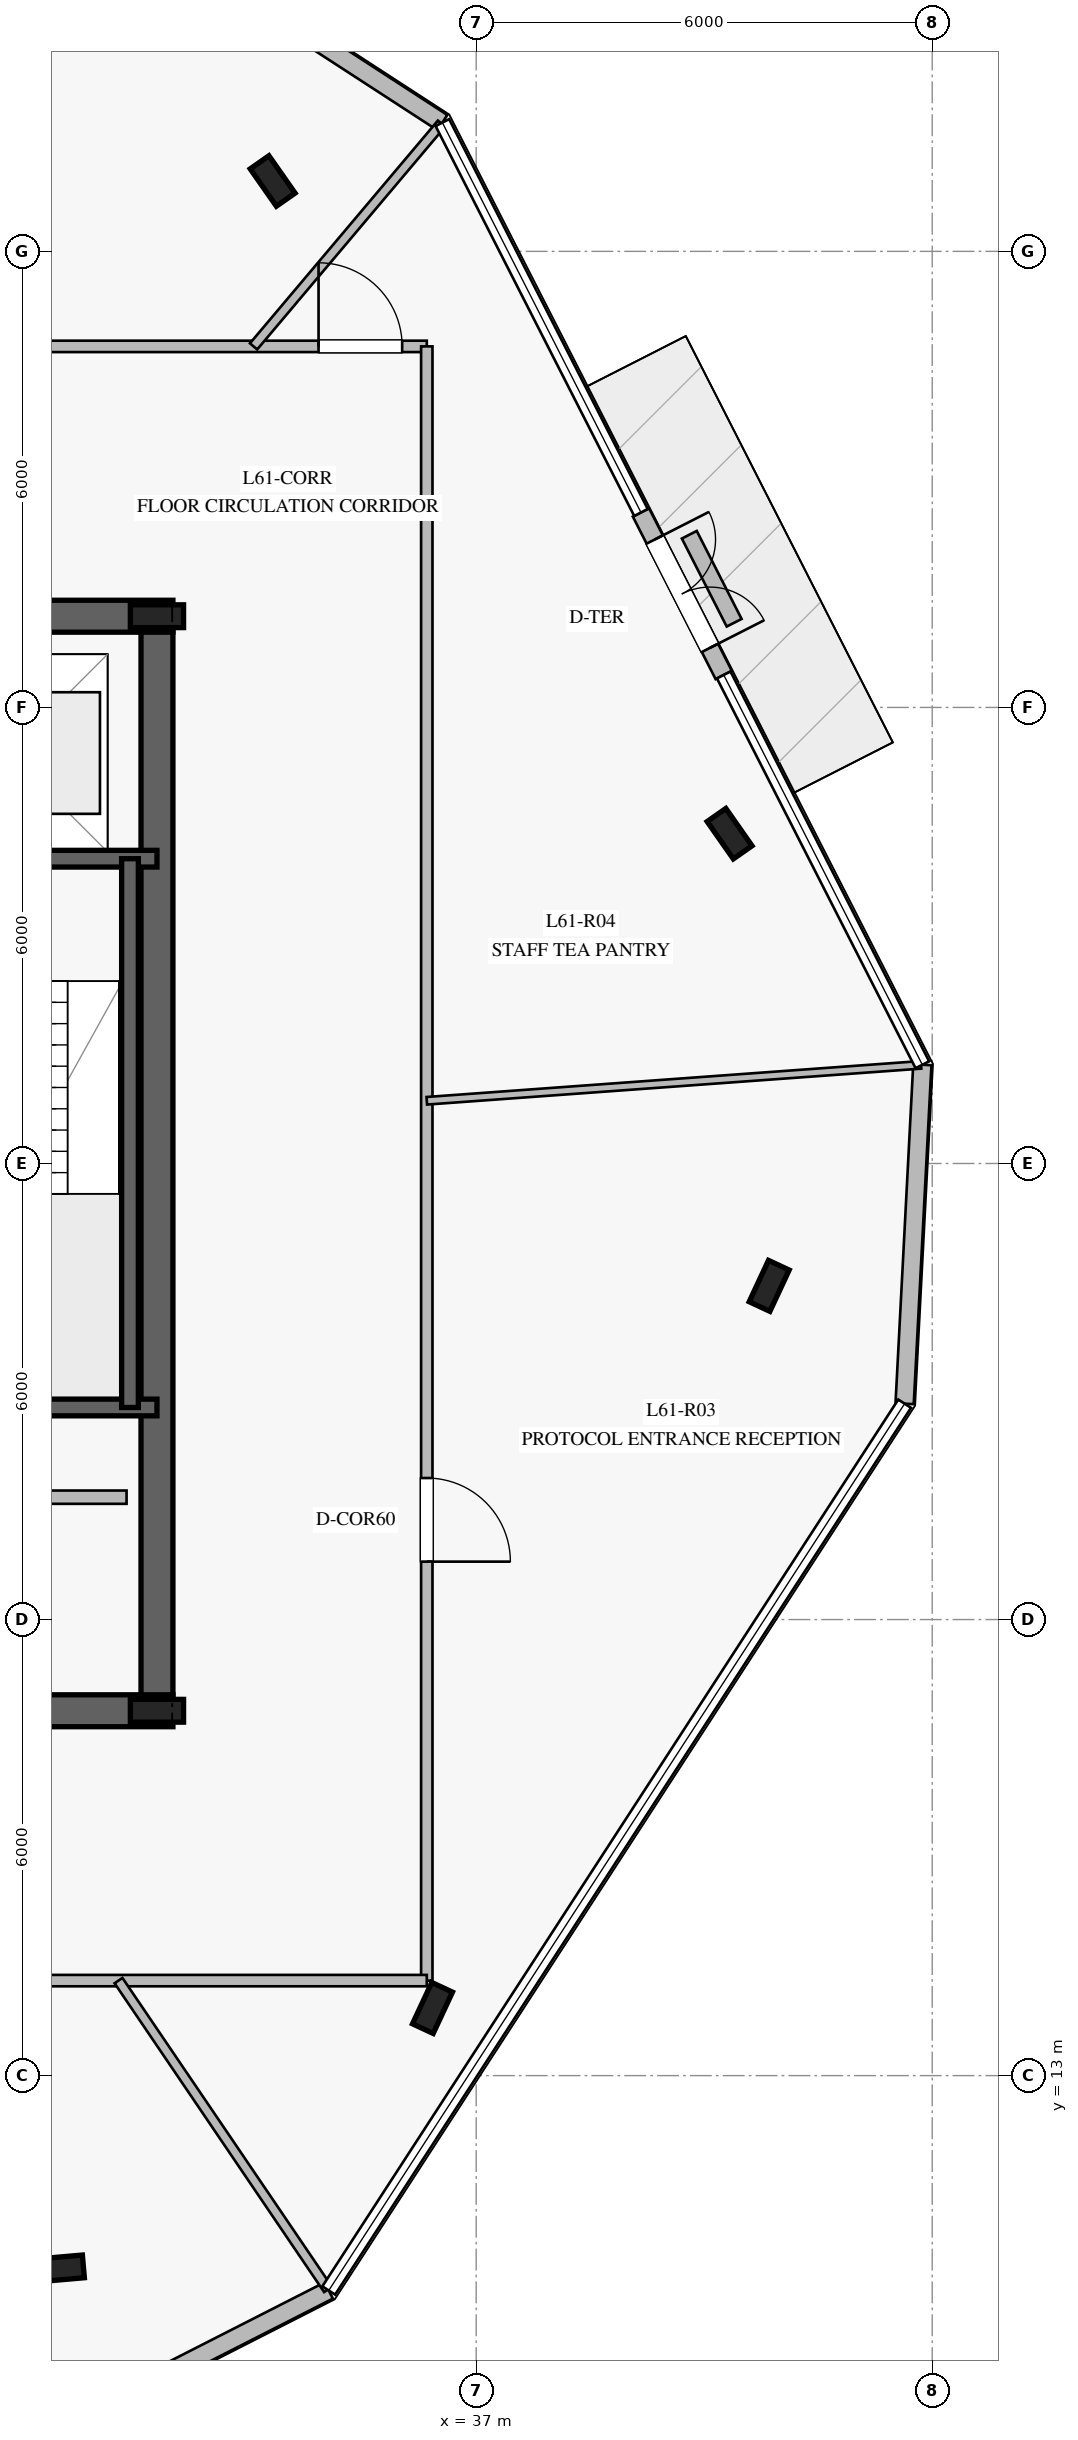
"""IFC4 building model, lengths in metres.
Left out: names, types, materials, properties, quantities, classifications, styles, units other than length and angle.
Written with IfcOpenShell. Run it as: python <this file> out.ifc"""

import sys

from ifc_helpers import new_model, si_unit, direction, frame, frame_2d, origin, origin_2d, place, context, subcontext, project, spatial, rectangle, i_section, extrude, element, fill, save


model = new_model("IFC4")
c1 = context("Model", 3, precision=1e-05, world=origin(), true_north=direction((0.0, 1.0)))
c2 = subcontext(c1, "Body", "Model", "MODEL_VIEW")
j1 = project(units=[si_unit("LENGTHUNIT", "METRE"), si_unit("PLANEANGLEUNIT", "RADIAN")], contexts=[c1])
p1 = place(None, origin())
s1 = spatial("IfcSite", under=j1, at=p1, CompositionType="ELEMENT")
p2 = place(p1, origin())
s2 = spatial("IfcBuilding", under=s1, at=p2, CompositionType="ELEMENT")
p3 = place(p2, frame((0.0, 0.0, 254.2)))
s3 = spatial("IfcBuildingStorey", under=s2, at=p3, CompositionType="ELEMENT", Elevation=254.2)
p4 = place(p3, frame((16.99, 17.8, 0.0), z_axis=(0.0, 0.0, 1.0), x_axis=(1.0, 0.0, 0.0)))
e1 = element("IfcWall", 1, at=p4, inside=s3, PredefinedType="SHEAR", context=c2, shape_type="SweptSolid", body=[
    extrude(rectangle(XDim=16.02, YDim=0.42, at=frame_2d((8.01, 0.0))), origin(), (0.0, 0.0, 1.0), 3.78),
])
p5 = place(p4, frame((4.96, 0.0, 0.0)))
e2 = element("IfcOpeningElement", 2, at=p5, cuts=e1, PredefinedType="OPENING", context=c2, shape_type="SweptSolid", body=[
    extrude(rectangle(XDim=1.2, YDim=2.25, at=frame_2d((0.6, 1.125))), frame((0.0, 0.22, 0.0), z_axis=(0.0, -1.0, 0.0), x_axis=(1.0, 0.0, 0.0)), (0.0, 0.0, 1.0), 0.44),
])
p6 = place(p4, frame((10.86, 0.0, 0.0)))
e3 = element("IfcOpeningElement", 3, at=p6, cuts=e1, PredefinedType="OPENING", context=c2, shape_type="SweptSolid", body=[
    extrude(rectangle(XDim=1.1, YDim=2.2, at=frame_2d((0.55, 1.1))), frame((0.0, 0.22, 0.0), z_axis=(0.0, -1.0, 0.0), x_axis=(1.0, 0.0, 0.0)), (0.0, 0.0, 1.0), 0.44),
])
p7 = place(p3, frame((33.01, 32.2, 0.0), z_axis=(0.0, 0.0, 1.0), x_axis=(-1.0, 0.0, 0.0)))
e4 = element("IfcWall", 4, at=p7, inside=s3, PredefinedType="SHEAR", context=c2, shape_type="SweptSolid", body=[
    extrude(rectangle(XDim=16.02, YDim=0.42, at=frame_2d((8.01, 0.0))), origin(), (0.0, 0.0, 1.0), 3.78),
])
p8 = place(p7, frame((4.96, 0.0, 0.0)))
e5 = element("IfcOpeningElement", 5, at=p8, cuts=e4, PredefinedType="OPENING", context=c2, shape_type="SweptSolid", body=[
    extrude(rectangle(XDim=1.2, YDim=2.25, at=frame_2d((0.6, 1.125))), frame((0.0, 0.22, 0.0), z_axis=(0.0, -1.0, 0.0), x_axis=(1.0, 0.0, 0.0)), (0.0, 0.0, 1.0), 0.44),
])
p9 = place(p7, frame((9.785, 0.0, 0.0)))
e6 = element("IfcOpeningElement", 6, at=p9, cuts=e4, PredefinedType="OPENING", context=c2, shape_type="SweptSolid", body=[
    extrude(rectangle(XDim=1.1, YDim=2.2, at=frame_2d((0.55, 1.1))), frame((0.0, 0.22, 0.0), z_axis=(0.0, -1.0, 0.0), x_axis=(1.0, 0.0, 0.0)), (0.0, 0.0, 1.0), 0.44),
])
p10 = place(p3, frame((32.8, 18.01, 0.0), z_axis=(0.0, 0.0, 1.0), x_axis=(0.0, 1.0, 0.0)))
e7 = element("IfcWall", 7, at=p10, inside=s3, PredefinedType="SHEAR", context=c2, shape_type="SweptSolid", body=[
    extrude(rectangle(XDim=13.98, YDim=0.42, at=frame_2d((6.99, 0.0))), origin(), (0.0, 0.0, 1.0), 3.78),
])
for number, where, z_axis, x_axis in (
    (8, (32.8, 17.8, 0.0), (0.0, 0.0, 1.0), (1.0, 0.0, 0.0)),
    (9, (32.8, 32.2, 0.0), (0.0, 0.0, 1.0), (1.0, 0.0, 0.0)),
):
    element("IfcColumn", number, at=place(p3, frame(where, z_axis=z_axis, x_axis=x_axis)), inside=s3, PredefinedType="COLUMN", context=c2, shape_type="SweptSolid", body=[
        extrude(i_section(OverallWidth=0.3, OverallDepth=0.7, WebThickness=0.017, FlangeThickness=0.032, at=origin_2d()), origin(), (0.0, 0.0, 1.0), 4.0),
    ])
for number, where, z_axis, x_axis in (
    (10, (29.08, 21.79, 0.0), (0.0, 0.0, 1.0), (1.0, 0.0, 0.0)),
    (11, (29.08, 29.01, 0.0), (0.0, 0.0, 1.0), (1.0, 0.0, 0.0)),
):
    element("IfcWall", number, at=place(p3, frame(where, z_axis=z_axis, x_axis=x_axis)), inside=s3, PredefinedType="SOLIDWALL", context=c2, shape_type="SweptSolid", body=[
        extrude(rectangle(XDim=3.72, YDim=0.22, at=frame_2d((1.86, 0.0))), origin(), (0.0, 0.0, 1.0), 3.78),
    ])
p11 = place(p3, frame((32.445, 29.01, 0.0), z_axis=(0.0, 0.0, 1.0), x_axis=(0.0, -1.0, 0.0)))
e12 = element("IfcWall", 12, at=p11, inside=s3, PredefinedType="SOLIDWALL", context=c2, shape_type="SweptSolid", body=[
    extrude(rectangle(XDim=7.22, YDim=0.22, at=frame_2d((3.61, 0.0))), origin(), (0.0, 0.0, 1.0), 3.78),
])
for number, where, z_axis, x_axis in (
    (13, (31.533, 10.464, 0.0), (0.0, 0.0, 1.0), (0.996, 0.087, 0.0)),
    (14, (36.425, 13.89, 0.0), (0.0, 0.0, 1.0), (0.423, 0.906, 0.0)),
    (15, (40.855, 23.39, 0.0), (0.0, 0.0, 1.0), (0.423, 0.906, 0.0)),
    (16, (40.334, 29.339, 0.0), (0.0, 0.0, 1.0), (-0.574, 0.819, 0.0)),
    (17, (34.322, 37.926, 0.0), (0.0, 0.0, 1.0), (-0.574, 0.819, 0.0)),
):
    element("IfcColumn", number, at=place(p3, frame(where, z_axis=z_axis, x_axis=x_axis)), inside=s3, PredefinedType="COLUMN", context=c2, shape_type="SweptSolid", body=[
        extrude(i_section(OverallWidth=0.3, OverallDepth=0.6, WebThickness=0.015, FlangeThickness=0.03, at=origin_2d()), origin(), (0.0, 0.0, 1.0), 4.0),
    ])
p12 = place(p3, frame((31.081, 8.146, 0.0), z_axis=(0.0, 0.0, 1.0), x_axis=(0.891034072926, 0.453936428243, 0.0)))
e18 = element("IfcWall", 18, at=p12, inside=s3, PredefinedType="STANDARD", context=c2, shape_type="SweptSolid", body=[
    extrude(rectangle(XDim=4.466, YDim=0.24, at=frame_2d((2.233, 0.0))), origin(), (0.0, 0.0, 1.0), 3.78),
])
p13 = place(p3, frame((42.637, 21.84, 0.0), z_axis=(0.0, 0.0, 1.0), x_axis=(0.052217320226, 0.998635745139, 0.0)))
e19 = element("IfcWall", 19, at=p13, inside=s3, PredefinedType="STANDARD", context=c2, shape_type="SweptSolid", body=[
    extrude(rectangle(XDim=4.465, YDim=0.24, at=frame_2d((2.232, 0.0))), origin(), (0.0, 0.0, 1.0), 3.78),
])
p14 = place(p3, frame((40.257, 31.427, 0.0), z_axis=(0.0, 0.0, 1.0), x_axis=(-0.453916635775, 0.891044155902, 0.0)))
e20 = element("IfcWall", 20, at=p14, inside=s3, PredefinedType="STANDARD", context=c2, shape_type="SweptSolid", body=[
    extrude(rectangle(XDim=2.399, YDim=0.24, at=frame_2d((1.2, 0.0))), origin(), (0.0, 0.0, 1.0), 3.78),
])
p15 = place(p14, frame((0.4, 0.0, 0.0)))
e21 = element("IfcOpeningElement", 21, at=p15, cuts=e20, PredefinedType="OPENING", context=c2, shape_type="SweptSolid", body=[
    extrude(rectangle(XDim=1.6, YDim=2.25, at=frame_2d((0.8, 1.125))), frame((0.0, 0.13, 0.0), z_axis=(0.0, -1.0, 0.0), x_axis=(1.0, 0.0, 0.0)), (0.0, 0.0, 1.0), 0.26),
])
p16 = place(p3, frame((36.555, 38.694, 0.0), z_axis=(0.0, 0.0, 1.0), x_axis=(-0.838677137994, 0.544628917893, 0.0)))
e22 = element("IfcWall", 22, at=p16, inside=s3, PredefinedType="STANDARD", context=c2, shape_type="SweptSolid", body=[
    extrude(rectangle(XDim=4.465, YDim=0.24, at=frame_2d((2.233, 0.0))), origin(), (0.0, 0.0, 1.0), 3.78),
])
p17 = place(p3, frame((40.394, 32.114, 0.0), z_axis=(0.0, 0.0, 1.0), x_axis=(-0.454038340343, 0.890982146565, 0.0)))
e23 = element("IfcWall", 23, at=p17, inside=s3, PredefinedType="USERDEFINED", context=c2, shape_type="SweptSolid", body=[
    extrude(rectangle(XDim=1.3, YDim=0.22, at=frame_2d((0.65, 0.0))), origin(), (0.0, 0.0, 1.0), 0.4),
])
p18 = place(p3, frame((30.3, 20.61, 0.0), z_axis=(0.0, 0.0, 1.0), x_axis=(1.0, 0.0, 0.0)))
e24 = element("IfcWall", 24, at=p18, inside=s3, PredefinedType="PARTITIONING", context=c2, shape_type="SweptSolid", body=[
    extrude(rectangle(XDim=2.1, YDim=0.175, at=frame_2d((1.05, 0.0))), origin(), (0.0, 0.0, 1.0), 3.78),
])
p19 = place(p3, frame((13.65, 35.75, 0.0), z_axis=(0.0, 0.0, 1.0), x_axis=(1.0, 0.0, 0.0)))
e25 = element("IfcWall", 25, at=p19, inside=s3, PredefinedType="PARTITIONING", context=c2, shape_type="SweptSolid", body=[
    extrude(rectangle(XDim=22.7, YDim=0.15, at=frame_2d((11.35, 0.0))), origin(), (0.0, 0.0, 1.0), 2.43),
])
p20 = place(p19, frame((21.276, 0.0, 0.0)))
e26 = element("IfcOpeningElement", 26, at=p20, cuts=e25, PredefinedType="OPENING", context=c2, shape_type="SweptSolid", body=[
    extrude(rectangle(XDim=1.1, YDim=2.2, at=frame_2d((0.55, 1.1))), frame((0.0, 0.085, 0.0), z_axis=(0.0, -1.0, 0.0), x_axis=(1.0, 0.0, 0.0)), (0.0, 0.0, 1.0), 0.17),
])
p21 = place(p19, frame((14.81, 0.0, 0.0)))
e27 = element("IfcOpeningElement", 27, at=p21, cuts=e25, PredefinedType="OPENING", context=c2, shape_type="SweptSolid", body=[
    extrude(rectangle(XDim=1.1, YDim=2.2, at=frame_2d((0.55, 1.1))), frame((0.0, 0.085, 0.0), z_axis=(0.0, -1.0, 0.0), x_axis=(1.0, 0.0, 0.0)), (0.0, 0.0, 1.0), 0.17),
])
p22 = place(p19, frame((4.835, 0.0, 0.0)))
e28 = element("IfcOpeningElement", 28, at=p22, cuts=e25, PredefinedType="OPENING", context=c2, shape_type="SweptSolid", body=[
    extrude(rectangle(XDim=1.1, YDim=2.2, at=frame_2d((0.55, 1.1))), frame((0.0, 0.085, 0.0), z_axis=(0.0, -1.0, 0.0), x_axis=(1.0, 0.0, 0.0)), (0.0, 0.0, 1.0), 0.17),
])
p23 = place(p3, frame((36.35, 35.75, 0.0), z_axis=(0.0, 0.0, 1.0), x_axis=(0.0, -1.0, 0.0)))
e29 = element("IfcWall", 29, at=p23, inside=s3, PredefinedType="PARTITIONING", context=c2, shape_type="SweptSolid", body=[
    extrude(rectangle(XDim=21.5, YDim=0.15, at=frame_2d((10.75, 0.0))), origin(), (0.0, 0.0, 1.0), 3.05),
])
p24 = place(p23, frame((14.888, 0.0, 0.0)))
e30 = element("IfcOpeningElement", 30, at=p24, cuts=e29, PredefinedType="OPENING", context=c2, shape_type="SweptSolid", body=[
    extrude(rectangle(XDim=1.1, YDim=2.2, at=frame_2d((0.55, 1.1))), frame((0.0, 0.085, 0.0), z_axis=(0.0, -1.0, 0.0), x_axis=(1.0, 0.0, 0.0)), (0.0, 0.0, 1.0), 0.17),
])
p25 = place(p3, frame((36.35, 14.25, 0.0), z_axis=(0.0, 0.0, 1.0), x_axis=(-1.0, 0.0, 0.0)))
e31 = element("IfcWall", 31, at=p25, inside=s3, PredefinedType="PARTITIONING", context=c2, shape_type="SweptSolid", body=[
    extrude(rectangle(XDim=22.7, YDim=0.15, at=frame_2d((11.35, 0.0))), origin(), (0.0, 0.0, 1.0), 3.28),
])
p26 = place(p25, frame((17.731, 0.0, 0.0)))
e32 = element("IfcOpeningElement", 32, at=p26, cuts=e31, PredefinedType="OPENING", context=c2, shape_type="SweptSolid", body=[
    extrude(rectangle(XDim=1.1, YDim=2.2, at=frame_2d((0.55, 1.1))), frame((0.0, 0.085, 0.0), z_axis=(0.0, -1.0, 0.0), x_axis=(1.0, 0.0, 0.0)), (0.0, 0.0, 1.0), 0.17),
])
p27 = place(p25, frame((8.654, 0.0, 0.0)))
e33 = element("IfcOpeningElement", 33, at=p27, cuts=e31, PredefinedType="OPENING", context=c2, shape_type="SweptSolid", body=[
    extrude(rectangle(XDim=1.1, YDim=2.2, at=frame_2d((0.55, 1.1))), frame((0.0, 0.085, 0.0), z_axis=(0.0, -1.0, 0.0), x_axis=(1.0, 0.0, 0.0)), (0.0, 0.0, 1.0), 0.17),
])
p28 = place(p3, frame((32.294, 14.25, 0.0), z_axis=(0.0, 0.0, 1.0), x_axis=(0.561508713747, -0.827470823888, 0.0)))
e34 = element("IfcWall", 34, at=p28, inside=s3, PredefinedType="PARTITIONING", context=c2, shape_type="SweptSolid", body=[
    extrude(rectangle(XDim=4.91, YDim=0.125, at=frame_2d((2.455, 0.0))), origin(), (0.0, 0.0, 1.0), 3.28),
])
p29 = place(p3, frame((36.35, 25.825, 0.0), z_axis=(0.0, 0.0, 1.0), x_axis=(0.997363550858, 0.072566847934, 0.0)))
e35 = element("IfcWall", 35, at=p29, inside=s3, PredefinedType="MOVABLE", context=c2, shape_type="SweptSolid", body=[
    extrude(rectangle(XDim=6.52, YDim=0.1, at=frame_2d((3.26, 0.0))), origin(), (0.0, 0.0, 1.0), 3.28),
])
p30 = place(p3, frame((34.071, 35.75, 0.0), z_axis=(0.0, 0.0, 1.0), x_axis=(0.644862803999, 0.764298347518, 0.0)))
e36 = element("IfcWall", 36, at=p30, inside=s3, PredefinedType="PARTITIONING", context=c2, shape_type="SweptSolid", body=[
    extrude(rectangle(XDim=3.835, YDim=0.125, at=frame_2d((1.917, 0.0))), origin(), (0.0, 0.0, 1.0), 3.28),
])
p31 = place(p15, frame((1.6, 0.0, 0.0), z_axis=(0.0, 0.0, 1.0), x_axis=(-1.0, 0.0, 0.0)))
e37 = element("IfcDoor", 37, at=p31, inside=s3, OperationType="DOUBLE_DOOR_SINGLE_SWING", PredefinedType="DOOR", context=c2, shape_type="SweptSolid", body=[
    extrude(rectangle(XDim=1.6, YDim=2.25, at=frame_2d((0.8, 1.125))), frame((0.0, 0.025, 0.0), z_axis=(0.0, -1.0, 0.0), x_axis=(1.0, 0.0, 0.0)), (0.0, 0.0, 1.0), 0.05),
])
fill(e21, e37)
p32 = place(p24, origin())
e38 = element("IfcDoor", 38, at=p32, inside=s3, OperationType="SINGLE_SWING_RIGHT", PredefinedType="DOOR", context=c2, shape_type="SweptSolid", body=[
    extrude(rectangle(XDim=1.1, YDim=2.2, at=frame_2d((0.55, 1.1))), frame((0.0, 0.025, 0.0), z_axis=(0.0, -1.0, 0.0), x_axis=(1.0, 0.0, 0.0)), (0.0, 0.0, 1.0), 0.05),
])
fill(e30, e38)
p33 = place(p20, origin())
e39 = element("IfcDoor", 39, at=p33, inside=s3, OperationType="SINGLE_SWING_LEFT", PredefinedType="DOOR", context=c2, shape_type="SweptSolid", body=[
    extrude(rectangle(XDim=1.1, YDim=2.2, at=frame_2d((0.55, 1.1))), frame((0.0, 0.025, 0.0), z_axis=(0.0, -1.0, 0.0), x_axis=(1.0, 0.0, 0.0)), (0.0, 0.0, 1.0), 0.05),
])
fill(e26, e39)
save(model, sys.argv[1])
